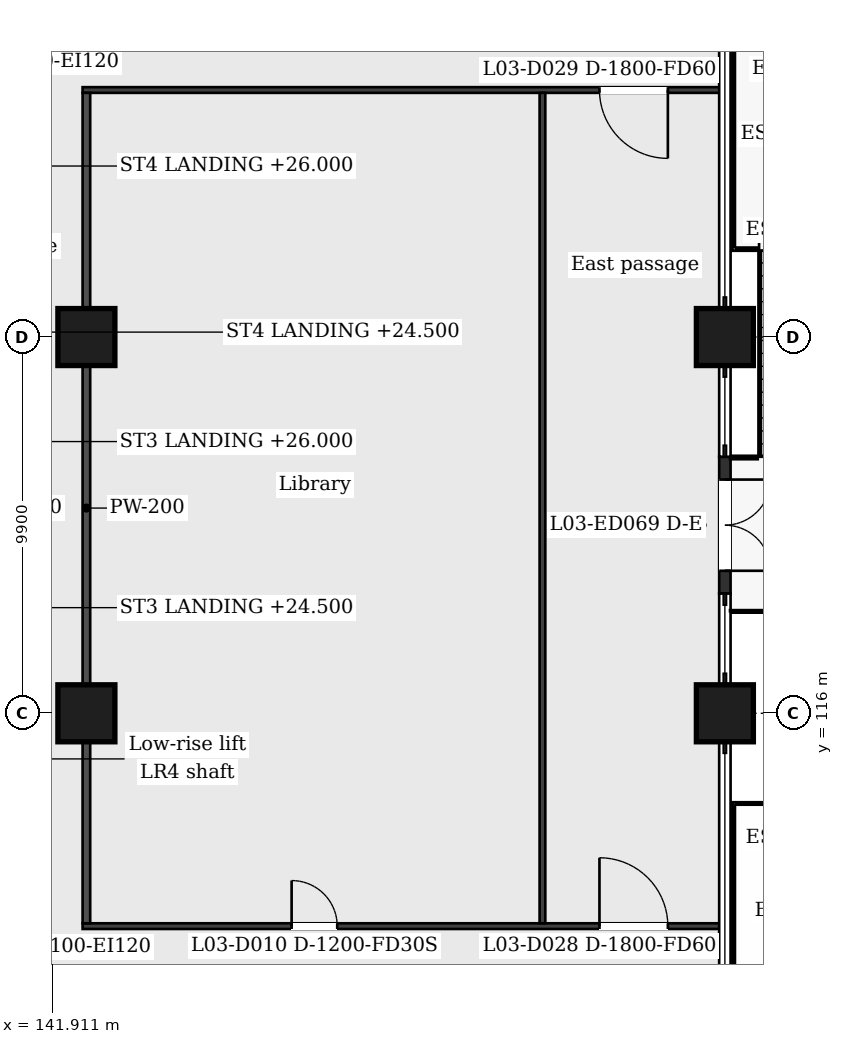
"""IFC4 building model, lengths in metres.
Left out: names, types, materials, properties, quantities, classifications, styles, units other than length and angle.
Written with IfcOpenShell. Run it as: python <this file> out.ifc"""

import sys

from ifc_helpers import new_model, si_unit, direction, frame, frame_2d, origin, origin_2d, place, context, subcontext, project, spatial, rectangle, extrude, element, fill, save


model = new_model("IFC4")
c1 = context("Model", 3, precision=1e-05, world=origin(), true_north=direction((0.0, 1.0)))
c2 = subcontext(c1, "Body", "Model", "MODEL_VIEW")
j1 = project(units=[si_unit("LENGTHUNIT", "METRE"), si_unit("PLANEANGLEUNIT", "RADIAN")], contexts=[c1])
p1 = place(None, origin())
s1 = spatial("IfcSite", under=j1, at=p1, CompositionType="ELEMENT")
p2 = place(p1, origin())
s2 = spatial("IfcBuilding", under=s1, at=p2, CompositionType="ELEMENT")
p3 = place(p2, frame((0.0, 0.0, 23.0)))
s3 = spatial("IfcBuildingStorey", under=s2, at=p3, CompositionType="ELEMENT", Elevation=23.0)
for number, where, z_axis, x_axis in (
    (1, (142.8, 116.0, 0.0), (0.0, 0.0, 1.0), (1.0, 0.0, 0.0)),
    (2, (159.6, 116.0, 0.0), (0.0, 0.0, 1.0), (1.0, 0.0, 0.0)),
    (3, (142.8, 125.9, 0.0), (0.0, 0.0, 1.0), (1.0, 0.0, 0.0)),
    (4, (159.6, 125.9, 0.0), (0.0, 0.0, 1.0), (1.0, 0.0, 0.0)),
):
    element("IfcColumn", number, at=place(p3, frame(where, z_axis=z_axis, x_axis=x_axis)), inside=s3, PredefinedType="COLUMN", context=c2, shape_type="SweptSolid", body=[
        extrude(rectangle(XDim=1.5, YDim=1.5, at=origin_2d()), origin(), (0.0, 0.0, 1.0), 6.0),
    ])
p4 = place(p3, frame((159.6, 122.75, 0.0), z_axis=(0.0, 0.0, 1.0), x_axis=(0.0, -1.0, 0.0)))
e5 = element("IfcWall", 5, at=p4, inside=s3, PredefinedType="SOLIDWALL", context=c2, shape_type="SweptSolid", body=[
    extrude(rectangle(XDim=3.6, YDim=0.3, at=frame_2d((1.8, 0.0))), origin(), (0.0, 0.0, 1.0), 5.1),
])
p5 = place(p4, frame((0.6, 0.0, 0.0)))
e6 = element("IfcOpeningElement", 6, at=p5, cuts=e5, PredefinedType="OPENING", context=c2, shape_type="SweptSolid", body=[
    extrude(rectangle(XDim=2.4, YDim=2.4, at=frame_2d((1.2, 1.2))), frame((0.0, 0.16, 0.0), z_axis=(0.0, -1.0, 0.0), x_axis=(1.0, 0.0, 0.0)), (0.0, 0.0, 1.0), 0.32),
])
p6 = place(p3, frame((142.7, 110.4, 0.0), z_axis=(0.0, 0.0, 1.0), x_axis=(1.0, 0.0, 0.0)))
e7 = element("IfcWall", 7, at=p6, inside=s3, PredefinedType="PARTITIONING", context=c2, shape_type="SweptSolid", body=[
    extrude(rectangle(XDim=16.85, YDim=0.15, at=frame_2d((8.425, 0.0))), origin(), (0.0, 0.0, 1.0), 5.5),
])
p7 = place(p6, frame((5.5, 0.0, 0.0)))
e8 = element("IfcOpeningElement", 8, at=p7, cuts=e7, PredefinedType="OPENING", context=c2, shape_type="SweptSolid", body=[
    extrude(rectangle(XDim=1.2, YDim=2.1, at=frame_2d((0.6, 1.05))), frame((0.0, 0.085, 0.0), z_axis=(0.0, -1.0, 0.0), x_axis=(1.0, 0.0, 0.0)), (0.0, 0.0, 1.0), 0.17),
])
p8 = place(p6, frame((13.6, 0.0, 0.0)))
e9 = element("IfcOpeningElement", 9, at=p8, cuts=e7, PredefinedType="OPENING", context=c2, shape_type="SweptSolid", body=[
    extrude(rectangle(XDim=1.8, YDim=2.1, at=frame_2d((0.9, 1.05))), frame((0.0, 0.085, 0.0), z_axis=(0.0, -1.0, 0.0), x_axis=(1.0, 0.0, 0.0)), (0.0, 0.0, 1.0), 0.17),
])
p9 = place(p3, frame((142.7, 132.4, 0.0), z_axis=(0.0, 0.0, 1.0), x_axis=(1.0, 0.0, 0.0)))
e10 = element("IfcWall", 10, at=p9, inside=s3, PredefinedType="PARTITIONING", context=c2, shape_type="SweptSolid", body=[
    extrude(rectangle(XDim=16.85, YDim=0.15, at=frame_2d((8.425, 0.0))), origin(), (0.0, 0.0, 1.0), 5.5),
])
p10 = place(p9, frame((13.6, 0.0, 0.0)))
e11 = element("IfcOpeningElement", 11, at=p10, cuts=e10, PredefinedType="OPENING", context=c2, shape_type="SweptSolid", body=[
    extrude(rectangle(XDim=1.8, YDim=2.1, at=frame_2d((0.9, 1.05))), frame((0.0, 0.085, 0.0), z_axis=(0.0, -1.0, 0.0), x_axis=(1.0, 0.0, 0.0)), (0.0, 0.0, 1.0), 0.17),
])
p11 = place(p3, frame((142.8, 110.475, 0.0), z_axis=(0.0, 0.0, 1.0), x_axis=(0.0, 1.0, 0.0)))
e12 = element("IfcWall", 12, at=p11, inside=s3, PredefinedType="PARTITIONING", context=c2, shape_type="SweptSolid", body=[
    extrude(rectangle(XDim=21.85, YDim=0.2, at=frame_2d((10.925, 0.0))), origin(), (0.0, 0.0, 1.0), 5.5),
])
p12 = place(p3, frame((154.8, 110.475, 0.0), z_axis=(0.0, 0.0, 1.0), x_axis=(0.0, 1.0, 0.0)))
e13 = element("IfcWall", 13, at=p12, inside=s3, PredefinedType="PARTITIONING", context=c2, shape_type="SweptSolid", body=[
    extrude(rectangle(XDim=21.85, YDim=0.15, at=frame_2d((10.925, 0.0))), origin(), (0.0, 0.0, 1.0), 5.5),
])
p13 = place(p5, origin())
e14 = element("IfcDoor", 14, at=p13, inside=s3, OperationType="DOUBLE_DOOR_DOUBLE_SWING", PredefinedType="DOOR", context=c2, shape_type="SweptSolid", body=[
    extrude(rectangle(XDim=2.4, YDim=2.4, at=frame_2d((1.2, 1.2))), frame((0.0, 0.025, 0.0), z_axis=(0.0, -1.0, 0.0), x_axis=(1.0, 0.0, 0.0)), (0.0, 0.0, 1.0), 0.05),
])
fill(e6, e14)
p14 = place(p7, origin())
e15 = element("IfcDoor", 15, at=p14, inside=s3, OperationType="SINGLE_SWING_LEFT", PredefinedType="DOOR", context=c2, shape_type="SweptSolid", body=[
    extrude(rectangle(XDim=1.2, YDim=2.1, at=frame_2d((0.6, 1.05))), frame((0.0, 0.025, 0.0), z_axis=(0.0, -1.0, 0.0), x_axis=(1.0, 0.0, 0.0)), (0.0, 0.0, 1.0), 0.05),
])
fill(e8, e15)
p15 = place(p8, origin())
e16 = element("IfcDoor", 16, at=p15, inside=s3, OperationType="SINGLE_SWING_LEFT", PredefinedType="DOOR", context=c2, shape_type="SweptSolid", body=[
    extrude(rectangle(XDim=1.8, YDim=2.1, at=frame_2d((0.9, 1.05))), frame((0.0, 0.025, 0.0), z_axis=(0.0, -1.0, 0.0), x_axis=(1.0, 0.0, 0.0)), (0.0, 0.0, 1.0), 0.05),
])
fill(e9, e16)
p16 = place(p10, origin())
e17 = element("IfcDoor", 17, at=p16, inside=s3, OperationType="SINGLE_SWING_RIGHT", PredefinedType="DOOR", context=c2, shape_type="SweptSolid", body=[
    extrude(rectangle(XDim=1.8, YDim=2.1, at=frame_2d((0.9, 1.05))), frame((0.0, 0.025, 0.0), z_axis=(0.0, -1.0, 0.0), x_axis=(1.0, 0.0, 0.0)), (0.0, 0.0, 1.0), 0.05),
])
fill(e11, e17)
save(model, sys.argv[1])
